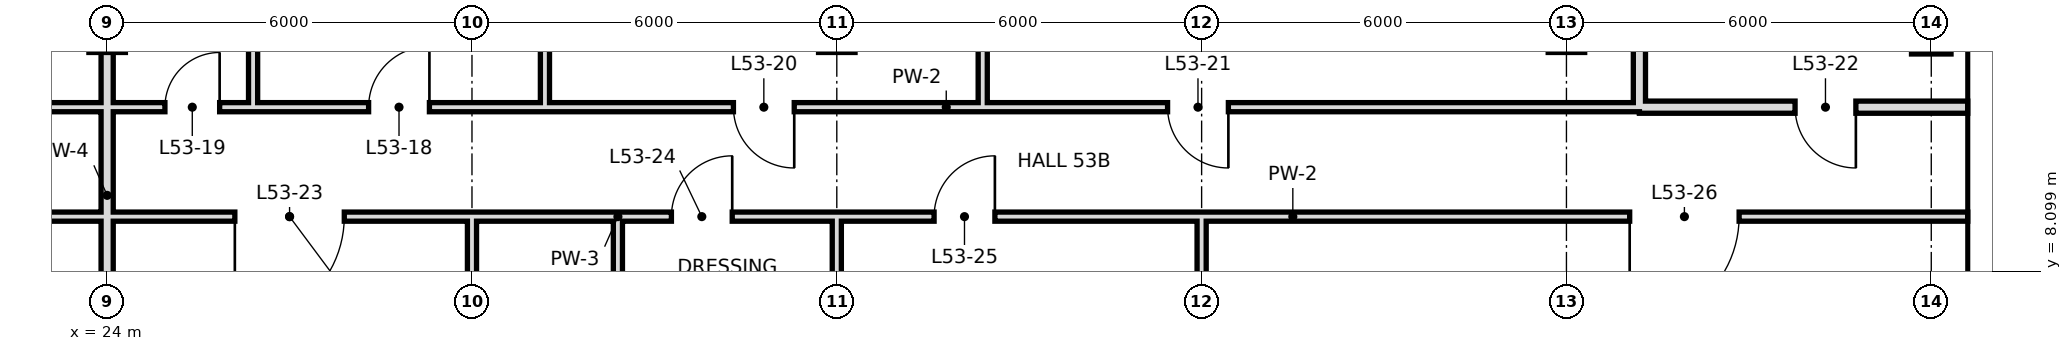
"""IFC4 building model, lengths in metres.
Left out: names, types, materials, properties, quantities, classifications, styles, units other than length and angle.
Written with IfcOpenShell. Run it as: python <this file> out.ifc"""

import sys

from ifc_helpers import new_model, si_unit, direction, frame, frame_2d, origin, origin_2d, place, context, subcontext, project, spatial, rectangle, hollow_rectangle, extrude, element, fill, save


model = new_model("IFC4")
c1 = context("Model", 3, precision=1e-05, world=origin(), true_north=direction((0.0, 1.0)))
c2 = subcontext(c1, "Body", "Model", "MODEL_VIEW")
j1 = project(units=[si_unit("LENGTHUNIT", "METRE"), si_unit("PLANEANGLEUNIT", "RADIAN")], contexts=[c1])
p1 = place(None, origin())
s1 = spatial("IfcSite", under=j1, at=p1, CompositionType="ELEMENT")
p2 = place(p1, origin())
s2 = spatial("IfcBuilding", under=s1, at=p2, CompositionType="ELEMENT")
p3 = place(p2, frame((0.0, 0.0, 226.2)))
s3 = spatial("IfcBuildingStorey", under=s2, at=p3, CompositionType="ELEMENT", Elevation=226.2)
p4 = place(p3, frame((54.0, 12.0, 0.0), z_axis=(0.0, 0.0, 1.0), x_axis=(1.0, 0.0, 0.0)))
e1 = element("IfcColumn", 1, at=p4, inside=s3, PredefinedType="COLUMN", context=c2, shape_type="SweptSolid", body=[
    extrude(hollow_rectangle(XDim=0.65, YDim=0.65, WallThickness=0.032, at=origin_2d()), origin(), (0.0, 0.0, 1.0), 3.6),
])
p5 = place(p3, frame((24.0, 0.0, 0.0), z_axis=(0.0, 0.0, 1.0), x_axis=(0.0, 1.0, 0.0)))
e2 = element("IfcWall", 2, at=p5, inside=s3, PredefinedType="SOLIDWALL", context=c2, shape_type="SweptSolid", body=[
    extrude(rectangle(XDim=18.7, YDim=0.2, at=frame_2d((9.35, 0.0))), origin(), (0.0, 0.0, 1.0), 2.72),
])
p6 = place(p3, frame((26.4, 10.8, 0.0), z_axis=(0.0, 0.0, 1.0), x_axis=(0.0, 1.0, 0.0)))
e3 = element("IfcWall", 3, at=p6, inside=s3, PredefinedType="PARTITIONING", context=c2, shape_type="SweptSolid", body=[
    extrude(rectangle(XDim=7.9, YDim=0.15, at=frame_2d((3.95, 0.0))), origin(), (0.0, 0.0, 1.0), 3.42),
])
p7 = place(p3, frame((30.0, 6.0, 0.0), z_axis=(0.0, 0.0, 1.0), x_axis=(0.0, 1.0, 0.0)))
e4 = element("IfcWall", 4, at=p7, inside=s3, PredefinedType="PARTITIONING", context=c2, shape_type="SweptSolid", body=[
    extrude(rectangle(XDim=3.0, YDim=0.15, at=frame_2d((1.5, 0.0))), origin(), (0.0, 0.0, 1.0), 2.72),
])
p8 = place(p3, frame((31.2, 10.8, 0.0), z_axis=(0.0, 0.0, 1.0), x_axis=(0.0, 1.0, 0.0)))
e5 = element("IfcWall", 5, at=p8, inside=s3, PredefinedType="PARTITIONING", context=c2, shape_type="SweptSolid", body=[
    extrude(rectangle(XDim=7.9, YDim=0.15, at=frame_2d((3.95, 0.0))), origin(), (0.0, 0.0, 1.0), 3.42),
])
p9 = place(p3, frame((32.4, 6.0, 0.0), z_axis=(0.0, 0.0, 1.0), x_axis=(0.0, 1.0, 0.0)))
e6 = element("IfcWall", 6, at=p9, inside=s3, PredefinedType="PARTITIONING", context=c2, shape_type="SweptSolid", body=[
    extrude(rectangle(XDim=3.0, YDim=0.15, at=frame_2d((1.5, 0.0))), origin(), (0.0, 0.0, 1.0), 3.42),
])
p10 = place(p3, frame((36.0, 0.0, 0.0), z_axis=(0.0, 0.0, 1.0), x_axis=(0.0, 1.0, 0.0)))
e7 = element("IfcWall", 7, at=p10, inside=s3, PredefinedType="PARTITIONING", context=c2, shape_type="SweptSolid", body=[
    extrude(rectangle(XDim=9.0, YDim=0.15, at=frame_2d((4.5, 0.0))), origin(), (0.0, 0.0, 1.0), 2.72),
])
p11 = place(p3, frame((38.4, 10.8, 0.0), z_axis=(0.0, 0.0, 1.0), x_axis=(0.0, 1.0, 0.0)))
e8 = element("IfcWall", 8, at=p11, inside=s3, PredefinedType="PARTITIONING", context=c2, shape_type="SweptSolid", body=[
    extrude(rectangle(XDim=7.9, YDim=0.15, at=frame_2d((3.95, 0.0))), origin(), (0.0, 0.0, 1.0), 3.42),
])
p12 = place(p3, frame((42.0, -0.6, 0.0), z_axis=(0.0, 0.0, 1.0), x_axis=(0.0, 1.0, 0.0)))
e9 = element("IfcWall", 9, at=p12, inside=s3, PredefinedType="PARTITIONING", context=c2, shape_type="SweptSolid", body=[
    extrude(rectangle(XDim=9.6, YDim=0.15, at=frame_2d((4.8, 0.0))), origin(), (0.0, 0.0, 1.0), 2.72),
])
p13 = place(p3, frame((49.2, 10.8, 0.0), z_axis=(0.0, 0.0, 1.0), x_axis=(0.0, 1.0, 0.0)))
e10 = element("IfcWall", 10, at=p13, inside=s3, PredefinedType="SOLIDWALL", context=c2, shape_type="SweptSolid", body=[
    extrude(rectangle(XDim=7.2, YDim=0.2, at=frame_2d((3.6, 0.0))), origin(), (0.0, 0.0, 1.0), 2.97),
])
p14 = place(p3, frame((49.2, 10.8, 0.0), z_axis=(0.0, 0.0, 1.0), x_axis=(1.0, 0.0, 0.0)))
e11 = element("IfcWall", 11, at=p14, inside=s3, PredefinedType="SOLIDWALL", context=c2, shape_type="SweptSolid", body=[
    extrude(rectangle(XDim=5.4, YDim=0.2, at=frame_2d((2.7, 0.0))), origin(), (0.0, 0.0, 1.0), 2.97),
])
p15 = place(p14, frame((2.56, 0.0, 0.0)))
e12 = element("IfcOpeningElement", 12, at=p15, cuts=e11, PredefinedType="OPENING", context=c2, shape_type="SweptSolid", body=[
    extrude(rectangle(XDim=1.0, YDim=2.4, at=frame_2d((0.5, 1.2))), frame((0.0, 0.11, 0.0), z_axis=(0.0, -1.0, 0.0), x_axis=(1.0, 0.0, 0.0)), (0.0, 0.0, 1.0), 0.22),
])
p16 = place(p3, frame((7.2, 10.8, 0.0), z_axis=(0.0, 0.0, 1.0), x_axis=(1.0, 0.0, 0.0)))
e13 = element("IfcWall", 13, at=p16, inside=s3, PredefinedType="PARTITIONING", context=c2, shape_type="SweptSolid", body=[
    extrude(rectangle(XDim=16.8, YDim=0.15, at=frame_2d((8.4, 0.0))), origin(), (0.0, 0.0, 1.0), 3.42),
])
p17 = place(p16, frame((1.6, 0.0, 0.0)))
e14 = element("IfcOpeningElement", 14, at=p17, cuts=e13, PredefinedType="OPENING", context=c2, shape_type="SweptSolid", body=[
    extrude(rectangle(XDim=1.0, YDim=2.4, at=frame_2d((0.5, 1.2))), frame((0.0, 0.085, 0.0), z_axis=(0.0, -1.0, 0.0), x_axis=(1.0, 0.0, 0.0)), (0.0, 0.0, 1.0), 0.17),
])
p18 = place(p16, frame((10.9, 0.0, 0.0)))
e15 = element("IfcOpeningElement", 15, at=p18, cuts=e13, PredefinedType="OPENING", context=c2, shape_type="SweptSolid", body=[
    extrude(rectangle(XDim=1.0, YDim=2.4, at=frame_2d((0.5, 1.2))), frame((0.0, 0.085, 0.0), z_axis=(0.0, -1.0, 0.0), x_axis=(1.0, 0.0, 0.0)), (0.0, 0.0, 1.0), 0.17),
])
p19 = place(p3, frame((26.4, 10.8, 0.0), z_axis=(0.0, 0.0, 1.0), x_axis=(1.0, 0.0, 0.0)))
e16 = element("IfcWall", 16, at=p19, inside=s3, PredefinedType="PARTITIONING", context=c2, shape_type="SweptSolid", body=[
    extrude(rectangle(XDim=22.8, YDim=0.15, at=frame_2d((11.4, 0.0))), origin(), (0.0, 0.0, 1.0), 3.42),
])
p20 = place(p19, frame((1.9, 0.0, 0.0)))
e17 = element("IfcOpeningElement", 17, at=p20, cuts=e16, PredefinedType="OPENING", context=c2, shape_type="SweptSolid", body=[
    extrude(rectangle(XDim=1.0, YDim=2.4, at=frame_2d((0.5, 1.2))), frame((0.0, 0.085, 0.0), z_axis=(0.0, -1.0, 0.0), x_axis=(1.0, 0.0, 0.0)), (0.0, 0.0, 1.0), 0.17),
])
p21 = place(p19, frame((7.9, 0.0, 0.0)))
e18 = element("IfcOpeningElement", 18, at=p21, cuts=e16, PredefinedType="OPENING", context=c2, shape_type="SweptSolid", body=[
    extrude(rectangle(XDim=1.0, YDim=2.4, at=frame_2d((0.5, 1.2))), frame((0.0, 0.085, 0.0), z_axis=(0.0, -1.0, 0.0), x_axis=(1.0, 0.0, 0.0)), (0.0, 0.0, 1.0), 0.17),
])
p22 = place(p19, frame((15.04, 0.0, 0.0)))
e19 = element("IfcOpeningElement", 19, at=p22, cuts=e16, PredefinedType="OPENING", context=c2, shape_type="SweptSolid", body=[
    extrude(rectangle(XDim=1.0, YDim=2.4, at=frame_2d((0.5, 1.2))), frame((0.0, 0.085, 0.0), z_axis=(0.0, -1.0, 0.0), x_axis=(1.0, 0.0, 0.0)), (0.0, 0.0, 1.0), 0.17),
])
p23 = place(p3, frame((24.0, 10.8, 0.0), z_axis=(0.0, 0.0, 1.0), x_axis=(1.0, 0.0, 0.0)))
e20 = element("IfcWall", 20, at=p23, inside=s3, PredefinedType="PARTITIONING", context=c2, shape_type="SweptSolid", body=[
    extrude(rectangle(XDim=2.4, YDim=0.15, at=frame_2d((1.2, 0.0))), origin(), (0.0, 0.0, 1.0), 3.42),
])
p24 = place(p23, frame((0.95, 0.0, 0.0)))
e21 = element("IfcOpeningElement", 21, at=p24, cuts=e20, PredefinedType="OPENING", context=c2, shape_type="SweptSolid", body=[
    extrude(rectangle(XDim=0.9, YDim=2.4, at=frame_2d((0.45, 1.2))), frame((0.0, 0.085, 0.0), z_axis=(0.0, -1.0, 0.0), x_axis=(1.0, 0.0, 0.0)), (0.0, 0.0, 1.0), 0.17),
])
p25 = place(p3, frame((24.0, 9.0, 0.0), z_axis=(0.0, 0.0, 1.0), x_axis=(1.0, 0.0, 0.0)))
e22 = element("IfcWall", 22, at=p25, inside=s3, PredefinedType="PARTITIONING", context=c2, shape_type="SweptSolid", body=[
    extrude(rectangle(XDim=6.0, YDim=0.15, at=frame_2d((3.0, 0.0))), origin(), (0.0, 0.0, 1.0), 3.42),
])
p26 = place(p25, frame((2.1, 0.0, 0.0)))
e23 = element("IfcOpeningElement", 23, at=p26, cuts=e22, PredefinedType="OPENING", context=c2, shape_type="SweptSolid", body=[
    extrude(rectangle(XDim=1.8, YDim=2.4, at=frame_2d((0.9, 1.2))), frame((0.0, 0.085, 0.0), z_axis=(0.0, -1.0, 0.0), x_axis=(1.0, 0.0, 0.0)), (0.0, 0.0, 1.0), 0.17),
])
p27 = place(p3, frame((32.4, 9.0, 0.0), z_axis=(0.0, 0.0, 1.0), x_axis=(1.0, 0.0, 0.0)))
e24 = element("IfcWall", 24, at=p27, inside=s3, PredefinedType="PARTITIONING", context=c2, shape_type="SweptSolid", body=[
    extrude(rectangle(XDim=22.2, YDim=0.15, at=frame_2d((11.1, 0.0))), origin(), (0.0, 0.0, 1.0), 3.42),
])
p28 = place(p27, frame((0.88, 0.0, 0.0)))
e25 = element("IfcOpeningElement", 25, at=p28, cuts=e24, PredefinedType="OPENING", context=c2, shape_type="SweptSolid", body=[
    extrude(rectangle(XDim=1.0, YDim=2.4, at=frame_2d((0.5, 1.2))), frame((0.0, 0.085, 0.0), z_axis=(0.0, -1.0, 0.0), x_axis=(1.0, 0.0, 0.0)), (0.0, 0.0, 1.0), 0.17),
])
p29 = place(p27, frame((5.2, 0.0, 0.0)))
e26 = element("IfcOpeningElement", 26, at=p29, cuts=e24, PredefinedType="OPENING", context=c2, shape_type="SweptSolid", body=[
    extrude(rectangle(XDim=1.0, YDim=2.4, at=frame_2d((0.5, 1.2))), frame((0.0, 0.085, 0.0), z_axis=(0.0, -1.0, 0.0), x_axis=(1.0, 0.0, 0.0)), (0.0, 0.0, 1.0), 0.17),
])
p30 = place(p27, frame((16.64, 0.0, 0.0)))
e27 = element("IfcOpeningElement", 27, at=p30, cuts=e24, PredefinedType="OPENING", context=c2, shape_type="SweptSolid", body=[
    extrude(rectangle(XDim=1.8, YDim=2.4, at=frame_2d((0.9, 1.2))), frame((0.0, 0.085, 0.0), z_axis=(0.0, -1.0, 0.0), x_axis=(1.0, 0.0, 0.0)), (0.0, 0.0, 1.0), 0.17),
])
p31 = place(p3, frame((20.4, 9.0, 0.0), z_axis=(0.0, 0.0, 1.0), x_axis=(1.0, 0.0, 0.0)))
e28 = element("IfcWall", 28, at=p31, inside=s3, PredefinedType="PARTITIONING", context=c2, shape_type="SweptSolid", body=[
    extrude(rectangle(XDim=3.6, YDim=0.15, at=frame_2d((1.8, 0.0))), origin(), (0.0, 0.0, 1.0), 3.42),
])
p32 = place(p3, frame((30.0, 9.0, 0.0), z_axis=(0.0, 0.0, 1.0), x_axis=(1.0, 0.0, 0.0)))
e29 = element("IfcWall", 29, at=p32, inside=s3, PredefinedType="PARTITIONING", context=c2, shape_type="SweptSolid", body=[
    extrude(rectangle(XDim=2.4, YDim=0.15, at=frame_2d((1.2, 0.0))), origin(), (0.0, 0.0, 1.0), 3.42),
])
p33 = place(p20, frame((1.0, 0.0, 0.0), z_axis=(0.0, 0.0, 1.0), x_axis=(-1.0, 0.0, 0.0)))
e30 = element("IfcDoor", 30, at=p33, inside=s3, OperationType="SINGLE_SWING_LEFT", PredefinedType="DOOR", context=c2, shape_type="SweptSolid", body=[
    extrude(rectangle(XDim=1.0, YDim=2.4, at=frame_2d((0.5, 1.2))), frame((0.0, 0.025, 0.0), z_axis=(0.0, -1.0, 0.0), x_axis=(1.0, 0.0, 0.0)), (0.0, 0.0, 1.0), 0.05),
])
fill(e17, e30)
p34 = place(p24, frame((0.9, 0.0, 0.0), z_axis=(0.0, 0.0, 1.0), x_axis=(-1.0, 0.0, 0.0)))
e31 = element("IfcDoor", 31, at=p34, inside=s3, OperationType="SINGLE_SWING_LEFT", PredefinedType="DOOR", context=c2, shape_type="SweptSolid", body=[
    extrude(rectangle(XDim=0.9, YDim=2.4, at=frame_2d((0.45, 1.2))), frame((0.0, 0.025, 0.0), z_axis=(0.0, -1.0, 0.0), x_axis=(1.0, 0.0, 0.0)), (0.0, 0.0, 1.0), 0.05),
])
fill(e21, e31)
p35 = place(p21, origin())
e32 = element("IfcDoor", 32, at=p35, inside=s3, OperationType="SINGLE_SWING_RIGHT", PredefinedType="DOOR", context=c2, shape_type="SweptSolid", body=[
    extrude(rectangle(XDim=1.0, YDim=2.4, at=frame_2d((0.5, 1.2))), frame((0.0, 0.025, 0.0), z_axis=(0.0, -1.0, 0.0), x_axis=(1.0, 0.0, 0.0)), (0.0, 0.0, 1.0), 0.05),
])
fill(e18, e32)
p36 = place(p22, origin())
e33 = element("IfcDoor", 33, at=p36, inside=s3, OperationType="SINGLE_SWING_RIGHT", PredefinedType="DOOR", context=c2, shape_type="SweptSolid", body=[
    extrude(rectangle(XDim=1.0, YDim=2.4, at=frame_2d((0.5, 1.2))), frame((0.0, 0.025, 0.0), z_axis=(0.0, -1.0, 0.0), x_axis=(1.0, 0.0, 0.0)), (0.0, 0.0, 1.0), 0.05),
])
fill(e19, e33)
p37 = place(p15, origin())
e34 = element("IfcDoor", 34, at=p37, inside=s3, OperationType="SINGLE_SWING_RIGHT", PredefinedType="DOOR", context=c2, shape_type="SweptSolid", body=[
    extrude(rectangle(XDim=1.0, YDim=2.4, at=frame_2d((0.5, 1.2))), frame((0.0, 0.025, 0.0), z_axis=(0.0, -1.0, 0.0), x_axis=(1.0, 0.0, 0.0)), (0.0, 0.0, 1.0), 0.05),
])
fill(e12, e34)
p38 = place(p26, frame((1.8, 0.0, 0.0), z_axis=(0.0, 0.0, 1.0), x_axis=(-1.0, 0.0, 0.0)))
e35 = element("IfcDoor", 35, at=p38, inside=s3, OperationType="SINGLE_SWING_RIGHT", PredefinedType="DOOR", context=c2, shape_type="SweptSolid", body=[
    extrude(rectangle(XDim=1.8, YDim=2.4, at=frame_2d((0.9, 1.2))), frame((0.0, 0.025, 0.0), z_axis=(0.0, -1.0, 0.0), x_axis=(1.0, 0.0, 0.0)), (0.0, 0.0, 1.0), 0.05),
])
fill(e23, e35)
p39 = place(p28, frame((1.0, 0.0, 0.0), z_axis=(0.0, 0.0, 1.0), x_axis=(-1.0, 0.0, 0.0)))
e36 = element("IfcDoor", 36, at=p39, inside=s3, OperationType="SINGLE_SWING_LEFT", PredefinedType="DOOR", context=c2, shape_type="SweptSolid", body=[
    extrude(rectangle(XDim=1.0, YDim=2.4, at=frame_2d((0.5, 1.2))), frame((0.0, 0.025, 0.0), z_axis=(0.0, -1.0, 0.0), x_axis=(1.0, 0.0, 0.0)), (0.0, 0.0, 1.0), 0.05),
])
fill(e25, e36)
p40 = place(p29, frame((1.0, 0.0, 0.0), z_axis=(0.0, 0.0, 1.0), x_axis=(-1.0, 0.0, 0.0)))
e37 = element("IfcDoor", 37, at=p40, inside=s3, OperationType="SINGLE_SWING_LEFT", PredefinedType="DOOR", context=c2, shape_type="SweptSolid", body=[
    extrude(rectangle(XDim=1.0, YDim=2.4, at=frame_2d((0.5, 1.2))), frame((0.0, 0.025, 0.0), z_axis=(0.0, -1.0, 0.0), x_axis=(1.0, 0.0, 0.0)), (0.0, 0.0, 1.0), 0.05),
])
fill(e26, e37)
p41 = place(p30, frame((1.8, 0.0, 0.0), z_axis=(0.0, 0.0, 1.0), x_axis=(-1.0, 0.0, 0.0)))
e38 = element("IfcDoor", 38, at=p41, inside=s3, OperationType="SINGLE_SWING_RIGHT", PredefinedType="DOOR", context=c2, shape_type="SweptSolid", body=[
    extrude(rectangle(XDim=1.8, YDim=2.4, at=frame_2d((0.9, 1.2))), frame((0.0, 0.025, 0.0), z_axis=(0.0, -1.0, 0.0), x_axis=(1.0, 0.0, 0.0)), (0.0, 0.0, 1.0), 0.05),
])
fill(e27, e38)
save(model, sys.argv[1])
